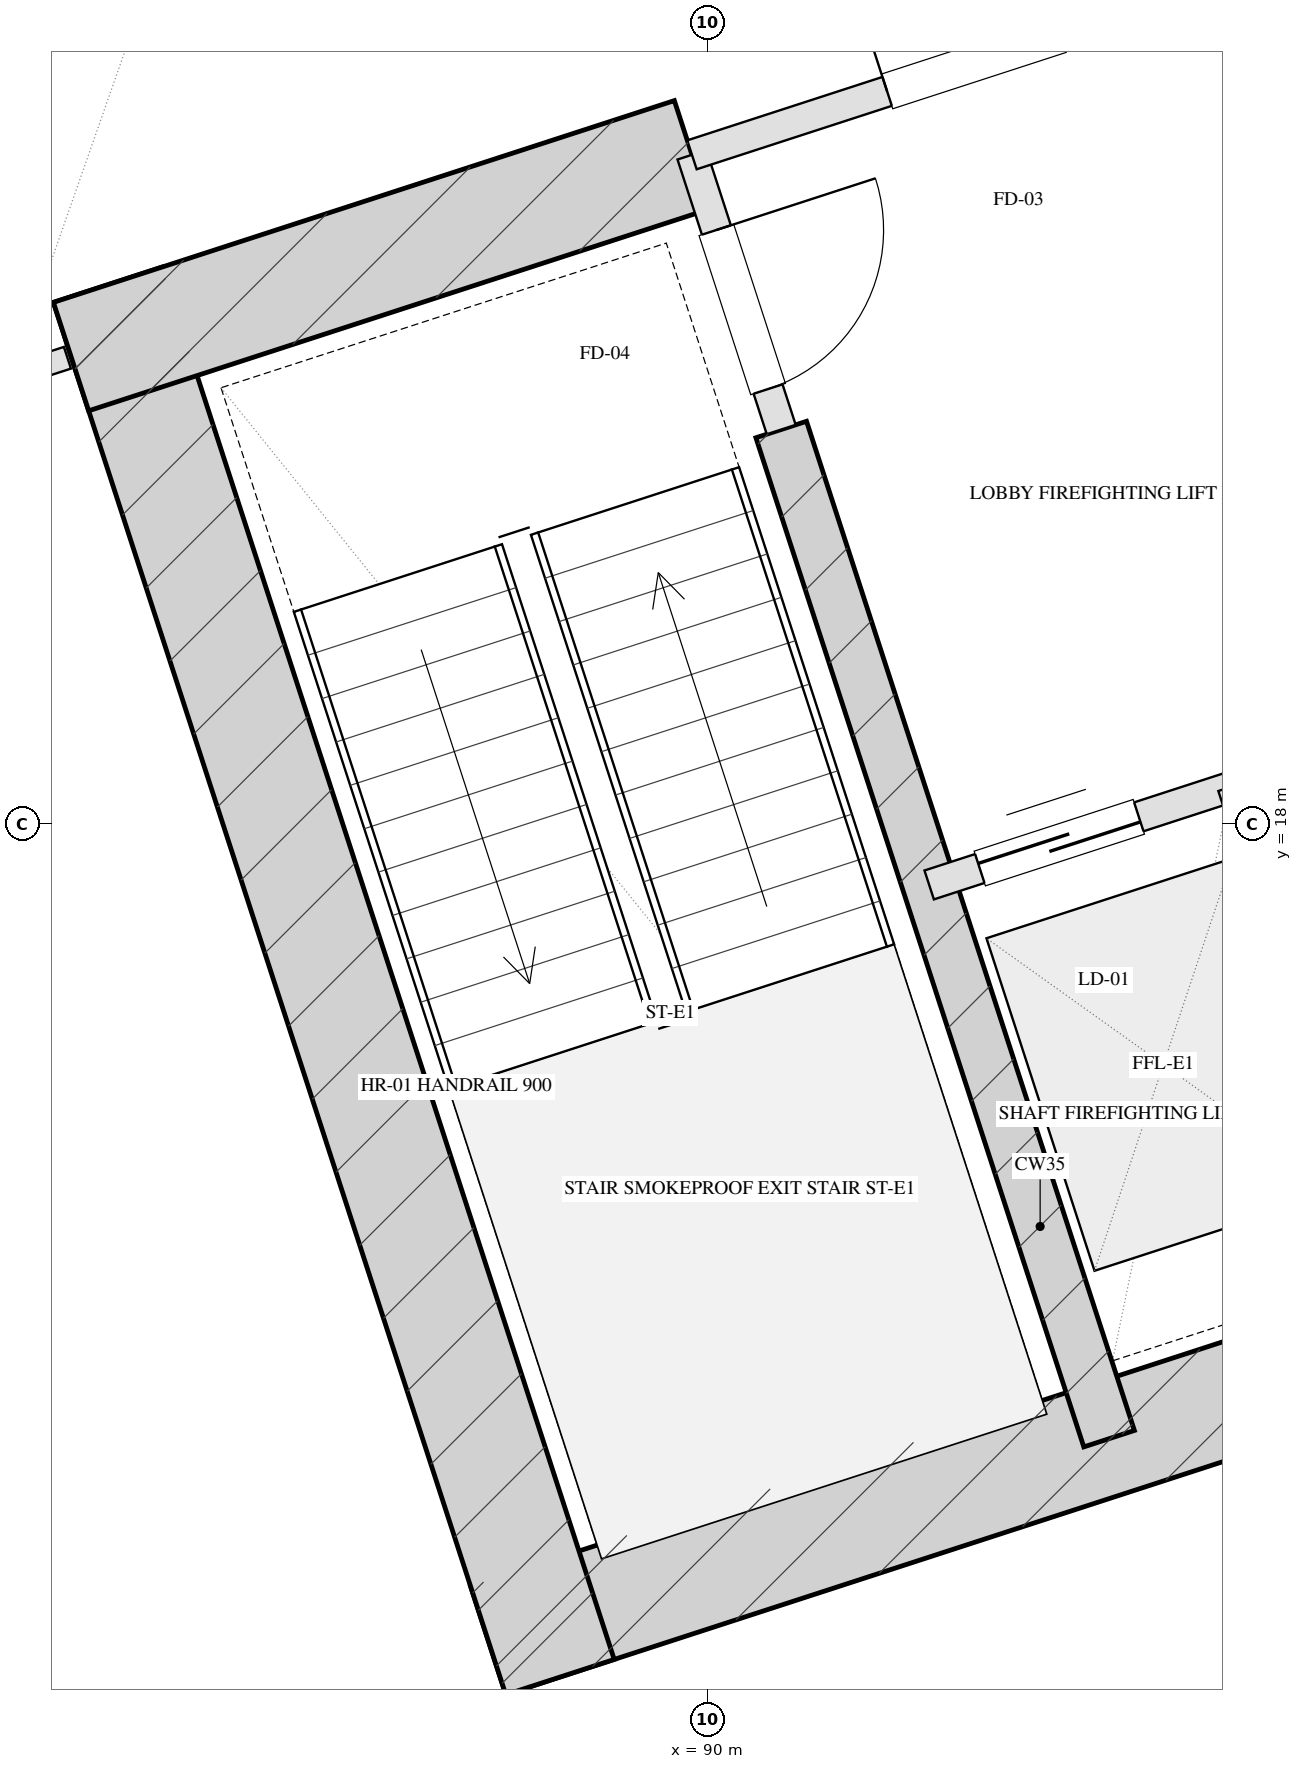
"""IFC4 building model, lengths in metres.
Left out: names, types, materials, properties, quantities, classifications, styles, units other than length and angle.
Written with IfcOpenShell. Run it as: python <this file> out.ifc"""

import sys

from ifc_helpers import new_model, si_unit, direction, frame, frame_2d, origin, place, context, subcontext, project, spatial, rectangle, extrude, element, fill, save


model = new_model("IFC4")
c1 = context("Model", 3, precision=1e-05, world=origin(), true_north=direction((0.0, 1.0)))
c2 = subcontext(c1, "Body", "Model", "MODEL_VIEW")
j1 = project(units=[si_unit("LENGTHUNIT", "METRE"), si_unit("PLANEANGLEUNIT", "RADIAN")], contexts=[c1])
p1 = place(None, origin())
s1 = spatial("IfcSite", under=j1, at=p1, CompositionType="ELEMENT")
p2 = place(p1, origin())
s2 = spatial("IfcBuilding", under=s1, at=p2, CompositionType="ELEMENT")
p3 = place(p2, frame((0.0, 0.0, 26.0)))
s3 = spatial("IfcBuildingStorey", under=s2, at=p3, CompositionType="ELEMENT", Elevation=26.0)
p4 = place(p3, frame((88.559, 12.629, 0.0), z_axis=(0.0, 0.0, 1.0), x_axis=(0.951056072937, 0.309018358888, 0.0)))
e1 = element("IfcWall", 1, at=p4, inside=s3, PredefinedType="SHEAR", context=c2, shape_type="SweptSolid", body=[
    extrude(rectangle(XDim=16.55, YDim=0.75, at=frame_2d((8.275, 0.0))), origin(), (0.0, 0.0, 1.0), 4.0),
])
p5 = place(p3, frame((86.055, 21.546, 0.0), z_axis=(0.0, 0.0, 1.0), x_axis=(0.309023585745, -0.951054374604, 0.0)))
e2 = element("IfcWall", 2, at=p5, inside=s3, PredefinedType="SHEAR", context=c2, shape_type="SweptSolid", body=[
    extrude(rectangle(XDim=9.63, YDim=0.75, at=frame_2d((4.815, 0.0))), origin(), (0.0, 0.0, 1.0), 4.0),
])
p6 = place(p3, frame((90.486, 20.594, 0.0), z_axis=(0.0, 0.0, 1.0), x_axis=(0.309020428229, -0.951055400562, 0.0)))
e3 = element("IfcWall", 3, at=p6, inside=s3, PredefinedType="SHEAR", context=c2, shape_type="SweptSolid", body=[
    extrude(rectangle(XDim=6.98, YDim=0.35, at=frame_2d((3.49, 0.0))), origin(), (0.0, 0.0, 1.0), 4.0),
])
p7 = place(p3, frame((85.814, 21.074, 0.0), z_axis=(0.0, 0.0, 1.0), x_axis=(0.95106580992, 0.308988390074, 0.0)))
e4 = element("IfcWall", 4, at=p7, inside=s3, PredefinedType="SHEAR", context=c2, shape_type="SweptSolid", body=[
    extrude(rectangle(XDim=4.295, YDim=0.75, at=frame_2d((2.147, 0.0))), origin(), (0.0, 0.0, 1.0), 4.0),
])
p8 = place(p3, frame((113.998, 12.567, 0.0), z_axis=(0.0, 0.0, 1.0), x_axis=(-0.951055939317, -0.309018770125, 0.0)))
e5 = element("IfcWall", 5, at=p8, inside=s3, PredefinedType="SOLIDWALL", context=c2, shape_type="SweptSolid", body=[
    extrude(rectangle(XDim=32.4, YDim=0.4, at=frame_2d((16.2, 0.0))), origin(), (0.0, 0.0, 1.0), 3.16),
])
p9 = place(p3, frame((89.899, 22.401, 0.0), z_axis=(0.0, 0.0, 1.0), x_axis=(0.308932062672, -0.951084108086, 0.0)))
e6 = element("IfcWall", 6, at=p9, inside=s3, PredefinedType="PARTITIONING", context=c2, shape_type="SweptSolid", body=[
    extrude(rectangle(XDim=1.9, YDim=0.2, at=frame_2d((0.95, 0.0))), origin(), (0.0, 0.0, 1.0), 3.725),
])
p10 = place(p9, frame((0.52, 0.0, 0.0)))
e7 = element("IfcOpeningElement", 7, at=p10, cuts=e6, PredefinedType="OPENING", context=c2, shape_type="SweptSolid", body=[
    extrude(rectangle(XDim=1.1, YDim=2.05, at=frame_2d((0.55, 1.025))), frame((0.0, 0.11, 0.0), z_axis=(0.0, -1.0, 0.0), x_axis=(1.0, 0.0, 0.0)), (0.0, 0.0, 1.0), 0.22),
])
p11 = place(p3, frame((89.899, 22.401, 0.0), z_axis=(0.0, 0.0, 1.0), x_axis=(0.951046716504, 0.309047153403, 0.0)))
e8 = element("IfcWall", 8, at=p11, inside=s3, PredefinedType="PARTITIONING", context=c2, shape_type="SweptSolid", body=[
    extrude(rectangle(XDim=3.83, YDim=0.2, at=frame_2d((1.915, 0.0))), origin(), (0.0, 0.0, 1.0), 3.725),
])
p12 = place(p11, frame((1.35, 0.0, 0.0)))
e9 = element("IfcOpeningElement", 9, at=p12, cuts=e8, PredefinedType="OPENING", context=c2, shape_type="SweptSolid", body=[
    extrude(rectangle(XDim=1.2, YDim=2.05, at=frame_2d((0.6, 1.025))), frame((0.0, 0.11, 0.0), z_axis=(0.0, -1.0, 0.0), x_axis=(1.0, 0.0, 0.0)), (0.0, 0.0, 1.0), 0.22),
])
p13 = place(p3, frame((91.46, 17.598, 0.0), z_axis=(0.0, 0.0, 1.0), x_axis=(0.951062257173, 0.308999325213, 0.0)))
e10 = element("IfcWall", 10, at=p13, inside=s3, PredefinedType="PARTITIONING", context=c2, shape_type="SweptSolid", body=[
    extrude(rectangle(XDim=2.1, YDim=0.2, at=frame_2d((1.05, 0.0))), origin(), (0.0, 0.0, 1.0), 3.725),
])
p14 = place(p13, frame((0.35, 0.0, 0.0)))
e11 = element("IfcOpeningElement", 11, at=p14, cuts=e10, PredefinedType="OPENING", context=c2, shape_type="SweptSolid", body=[
    extrude(rectangle(XDim=1.1, YDim=2.05, at=frame_2d((0.55, 1.025))), frame((0.0, 0.11, 0.0), z_axis=(0.0, -1.0, 0.0), x_axis=(1.0, 0.0, 0.0)), (0.0, 0.0, 1.0), 0.22),
])
p15 = place(p3, frame((93.457, 18.247, 0.0), z_axis=(0.0, 0.0, 1.0), x_axis=(0.3089935693, -0.951064127245, 0.0)))
e12 = element("IfcWall", 12, at=p15, inside=s3, PredefinedType="PARTITIONING", context=c2, shape_type="SweptSolid", body=[
    extrude(rectangle(XDim=3.7, YDim=0.2, at=frame_2d((1.85, 0.0))), origin(), (0.0, 0.0, 1.0), 3.725),
])
p16 = place(p3, frame((75.519, 17.729, 0.0), z_axis=(0.0, 0.0, 1.0), x_axis=(0.951056658866, 0.309016555588, 0.0)))
e13 = element("IfcWall", 13, at=p16, inside=s3, PredefinedType="PARTITIONING", context=c2, shape_type="SweptSolid", body=[
    extrude(rectangle(XDim=10.8, YDim=0.15, at=frame_2d((5.4, 0.0))), origin(), (0.0, 0.0, 1.0), 3.725),
])
p17 = place(p16, frame((4.536, 0.0, 0.0)))
e14 = element("IfcOpeningElement", 14, at=p17, cuts=e13, PredefinedType="OPENING", context=c2, shape_type="SweptSolid", body=[
    extrude(rectangle(XDim=1.0, YDim=2.05, at=frame_2d((0.5, 1.025))), frame((0.0, 0.085, 0.0), z_axis=(0.0, -1.0, 0.0), x_axis=(1.0, 0.0, 0.0)), (0.0, 0.0, 1.0), 0.17),
])
p18 = place(p3, frame((74.691, 20.278, 0.0), z_axis=(0.0, 0.0, 1.0), x_axis=(0.951052712421, 0.309028701251, 0.0)))
e15 = element("IfcWall", 15, at=p18, inside=s3, PredefinedType="PARTITIONING", context=c2, shape_type="SweptSolid", body=[
    extrude(rectangle(XDim=13.375, YDim=0.15, at=frame_2d((6.688, 0.0))), origin(), (0.0, 0.0, 1.0), 3.725),
])
p19 = place(p10, origin())
e16 = element("IfcDoor", 16, at=p19, inside=s3, OperationType="SINGLE_SWING_LEFT", PredefinedType="DOOR", context=c2, shape_type="SweptSolid", body=[
    extrude(rectangle(XDim=1.1, YDim=2.05, at=frame_2d((0.55, 1.025))), frame((0.0, 0.025, 0.0), z_axis=(0.0, -1.0, 0.0), x_axis=(1.0, 0.0, 0.0)), (0.0, 0.0, 1.0), 0.05),
])
fill(e7, e16)
p20 = place(p12, origin())
e17 = element("IfcDoor", 17, at=p20, inside=s3, OperationType="SINGLE_SWING_LEFT", PredefinedType="DOOR", context=c2, shape_type="SweptSolid", body=[
    extrude(rectangle(XDim=1.2, YDim=2.05, at=frame_2d((0.6, 1.025))), frame((0.0, 0.025, 0.0), z_axis=(0.0, -1.0, 0.0), x_axis=(1.0, 0.0, 0.0)), (0.0, 0.0, 1.0), 0.05),
])
fill(e9, e17)
p21 = place(p14, origin())
e18 = element("IfcDoor", 18, at=p21, inside=s3, OperationType="DOUBLE_DOOR_SLIDING", PredefinedType="DOOR", context=c2, shape_type="SweptSolid", body=[
    extrude(rectangle(XDim=1.1, YDim=2.05, at=frame_2d((0.55, 1.025))), frame((0.0, 0.025, 0.0), z_axis=(0.0, -1.0, 0.0), x_axis=(1.0, 0.0, 0.0)), (0.0, 0.0, 1.0), 0.05),
])
fill(e11, e18)
save(model, sys.argv[1])
